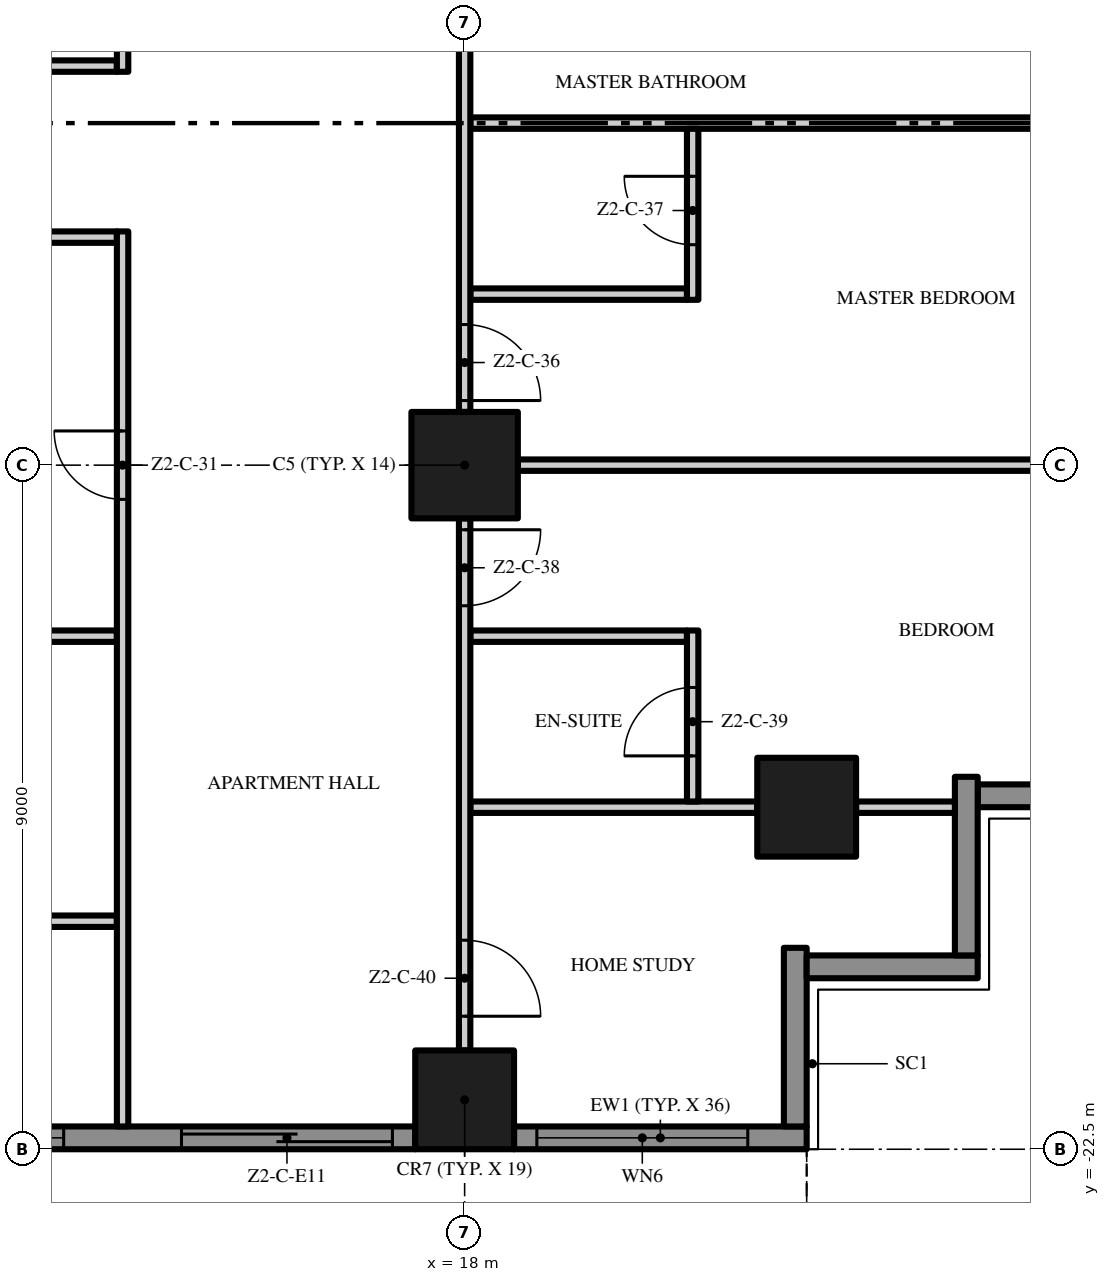
"""IFC4 building model, lengths in metres.
Left out: names, types, materials, properties, quantities, classifications, styles, units other than length and angle.
Written with IfcOpenShell. Run it as: python <this file> out.ifc"""

import sys

from ifc_helpers import new_model, si_unit, direction, frame, frame_2d, origin, origin_2d, place, context, subcontext, project, spatial, polyline, rectangle, outline, extrude, element, fill, save


model = new_model("IFC4")
c1 = context("Model", 3, precision=1e-05, world=origin(), true_north=direction((0.0, 1.0)))
c2 = subcontext(c1, "Body", "Model", "MODEL_VIEW")
j1 = project(units=[si_unit("LENGTHUNIT", "METRE"), si_unit("PLANEANGLEUNIT", "RADIAN")], contexts=[c1])
p1 = place(None, origin())
s1 = spatial("IfcSite", under=j1, at=p1, CompositionType="ELEMENT")
p2 = place(p1, origin())
s2 = spatial("IfcBuilding", under=s1, at=p2, CompositionType="ELEMENT")
p3 = place(p2, frame((0.0, 0.0, 96.0)))
s3 = spatial("IfcBuildingStorey", under=s2, at=p3, CompositionType="ELEMENT", Elevation=96.0)
p4 = place(p3, frame((18.0, -13.5, 0.0), z_axis=(0.0, 0.0, 1.0), x_axis=(1.0, 0.0, 0.0)))
e1 = element("IfcColumn", 1, at=p4, inside=s3, PredefinedType="COLUMN", context=c2, shape_type="SweptSolid", body=[
    extrude(rectangle(XDim=1.4, YDim=1.4, at=origin_2d()), origin(), (0.0, 0.0, 1.0), 3.5),
])
for number, where, z_axis, x_axis in (
    (2, (18.0, -21.85, 0.0), (0.0, 0.0, 1.0), (1.0, 0.0, 0.0)),
    (3, (22.5, -18.0, 0.0), (0.0, 0.0, 1.0), (1.0, 0.0, 0.0)),
):
    element("IfcColumn", number, at=place(p3, frame(where, z_axis=z_axis, x_axis=x_axis)), inside=s3, PredefinedType="COLUMN", context=c2, shape_type="SweptSolid", body=[
        extrude(rectangle(XDim=1.3, YDim=1.3, at=origin_2d()), origin(), (0.0, 0.0, 1.0), 3.5),
    ])
p5 = place(p3, frame((17.35, -22.35, 0.0), z_axis=(0.0, 0.0, 1.0), x_axis=(-1.0, 0.0, 0.0)))
e4 = element("IfcWall", 4, at=p5, inside=s3, PredefinedType="SOLIDWALL", context=c2, shape_type="SweptSolid", body=[
    extrude(rectangle(XDim=7.7, YDim=0.3, at=frame_2d((3.85, 0.0))), origin(), (0.0, 0.0, 1.0), 3.5),
])
p6 = place(p5, frame((4.625, 0.0, 0.45)))
e5 = element("IfcOpeningElement", 5, at=p6, cuts=e4, PredefinedType="OPENING", context=c2, shape_type="SweptSolid", body=[
    extrude(rectangle(XDim=2.775, YDim=2.65, at=frame_2d((1.387, 1.325))), frame((0.0, 0.16, 0.0), z_axis=(0.0, -1.0, 0.0), x_axis=(1.0, 0.0, 0.0)), (0.0, 0.0, 1.0), 0.32),
])
p7 = place(p5, frame((0.3, 0.0, 0.0)))
e6 = element("IfcOpeningElement", 6, at=p7, cuts=e4, PredefinedType="OPENING", context=c2, shape_type="SweptSolid", body=[
    extrude(rectangle(XDim=2.775, YDim=2.4, at=frame_2d((1.387, 1.2))), frame((0.0, 0.16, 0.0), z_axis=(0.0, -1.0, 0.0), x_axis=(1.0, 0.0, 0.0)), (0.0, 0.0, 1.0), 0.32),
])
p8 = place(p3, frame((22.5, -22.35, 0.0), z_axis=(0.0, 0.0, 1.0), x_axis=(-1.0, 0.0, 0.0)))
e7 = element("IfcWall", 7, at=p8, inside=s3, PredefinedType="SOLIDWALL", context=c2, shape_type="SweptSolid", body=[
    extrude(rectangle(XDim=3.85, YDim=0.3, at=frame_2d((1.925, 0.0))), origin(), (0.0, 0.0, 1.0), 3.5),
])
p9 = place(p8, frame((0.775, 0.0, 0.45)))
e8 = element("IfcOpeningElement", 8, at=p9, cuts=e7, PredefinedType="OPENING", context=c2, shape_type="SweptSolid", body=[
    extrude(rectangle(XDim=2.775, YDim=2.65, at=frame_2d((1.387, 1.325))), frame((0.0, 0.16, 0.0), z_axis=(0.0, -1.0, 0.0), x_axis=(1.0, 0.0, 0.0)), (0.0, 0.0, 1.0), 0.32),
])
p10 = place(p3, frame((22.35, -19.85, 0.0), z_axis=(0.0, 0.0, 1.0), x_axis=(0.0, -1.0, 0.0)))
e9 = element("IfcWall", 9, at=p10, inside=s3, PredefinedType="SOLIDWALL", context=c2, shape_type="SweptSolid", body=[
    extrude(rectangle(XDim=2.35, YDim=0.3, at=frame_2d((1.175, 0.0))), origin(), (0.0, 0.0, 1.0), 3.5),
])
p11 = place(p3, frame((24.75, -20.1, 0.0), z_axis=(0.0, 0.0, 1.0), x_axis=(-1.0, 0.0, 0.0)))
e10 = element("IfcWall", 10, at=p11, inside=s3, PredefinedType="SOLIDWALL", context=c2, shape_type="SweptSolid", body=[
    extrude(rectangle(XDim=2.25, YDim=0.3, at=frame_2d((1.125, 0.0))), origin(), (0.0, 0.0, 1.0), 3.5),
])
p12 = place(p3, frame((24.6, -17.6, 0.0), z_axis=(0.0, 0.0, 1.0), x_axis=(0.0, -1.0, 0.0)))
e11 = element("IfcWall", 11, at=p12, inside=s3, PredefinedType="SOLIDWALL", context=c2, shape_type="SweptSolid", body=[
    extrude(rectangle(XDim=2.35, YDim=0.3, at=frame_2d((1.175, 0.0))), origin(), (0.0, 0.0, 1.0), 3.5),
])
p13 = place(p3, frame((27.0, -17.85, 0.0), z_axis=(0.0, 0.0, 1.0), x_axis=(-1.0, 0.0, 0.0)))
e12 = element("IfcWall", 12, at=p13, inside=s3, PredefinedType="SOLIDWALL", context=c2, shape_type="SweptSolid", body=[
    extrude(rectangle(XDim=2.25, YDim=0.3, at=frame_2d((1.125, 0.0))), origin(), (0.0, 0.0, 1.0), 3.5),
])
p14 = place(p3, origin())
e13 = element("IfcWall", 13, at=p14, inside=s3, PredefinedType="USERDEFINED", context=c2, shape_type="SweptSolid", body=[
    extrude(outline(polyline([(-22.5, -23.451), (-21.0, -23.115), (-20.625, -23.1), (-19.5, -23.231), (-18.0, -23.755), (-16.5, -24.488), (-15.0, -25.149), (-13.5, -25.485), (-13.125, -25.5), (-12.0, -25.369), (-10.5, -24.845), (-9.0, -24.112), (-7.5, -23.451), (-6.0, -23.115), (-5.625, -23.1), (-4.5, -23.231), (-3.0, -23.755), (-1.5, -24.488), (0.0, -25.149), (1.5, -25.485), (1.875, -25.5), (3.0, -25.369), (4.5, -24.845), (6.0, -24.112), (7.5, -23.451), (9.0, -23.115), (9.375, -23.1), (10.5, -23.231), (12.0, -23.755), (13.5, -24.488), (15.0, -25.149), (16.5, -25.485), (16.875, -25.5), (18.0, -25.369), (19.5, -24.845), (21.0, -24.112), (22.5, -23.451), (22.399, -23.223), (20.895, -23.885), (19.404, -24.614), (17.944, -25.124), (16.865, -25.249), (16.533, -25.236), (15.079, -24.91), (13.605, -24.261), (12.096, -23.524), (10.556, -22.986), (9.385, -22.849), (8.967, -22.866), (7.421, -23.213), (5.895, -23.885), (4.404, -24.614), (2.944, -25.124), (1.865, -25.249), (1.533, -25.236), (0.079, -24.91), (-1.395, -24.261), (-2.904, -23.524), (-4.444, -22.986), (-5.615, -22.849), (-6.033, -22.866), (-7.579, -23.213), (-9.105, -23.885), (-10.596, -24.614), (-12.056, -25.124), (-13.135, -25.249), (-13.467, -25.236), (-14.921, -24.91), (-16.395, -24.261), (-17.904, -23.524), (-19.444, -22.986), (-20.615, -22.849), (-21.033, -22.866), (-22.555, -23.208), (-22.5, -23.451)])), origin(), (0.0, 0.0, 1.0), 0.9),
])
p15 = place(p3, frame((9.075, -19.5, 0.0), z_axis=(0.0, 0.0, 1.0), x_axis=(1.0, 0.0, 0.0)))
e14 = element("IfcWall", 14, at=p15, inside=s3, PredefinedType="PARTITIONING", context=c2, shape_type="SweptSolid", body=[
    extrude(rectangle(XDim=4.35, YDim=0.15, at=frame_2d((2.175, 0.0))), origin(), (0.0, 0.0, 1.0), 3.5),
])
p16 = place(p3, frame((18.075, -18.0, 0.0), z_axis=(0.0, 0.0, 1.0), x_axis=(1.0, 0.0, 0.0)))
e15 = element("IfcWall", 15, at=p16, inside=s3, PredefinedType="PARTITIONING", context=c2, shape_type="SweptSolid", body=[
    extrude(rectangle(XDim=3.775, YDim=0.15, at=frame_2d((1.887, 0.0))), origin(), (0.0, 0.0, 1.0), 3.5),
])
p17 = place(p3, frame((23.15, -18.0, 0.0), z_axis=(0.0, 0.0, 1.0), x_axis=(1.0, 0.0, 0.0)))
e16 = element("IfcWall", 16, at=p17, inside=s3, PredefinedType="PARTITIONING", context=c2, shape_type="SweptSolid", body=[
    extrude(rectangle(XDim=1.3, YDim=0.15, at=frame_2d((0.65, 0.0))), origin(), (0.0, 0.0, 1.0), 3.5),
])
p18 = place(p3, frame((13.425, -15.75, 0.0), z_axis=(0.0, 0.0, 1.0), x_axis=(-1.0, 0.0, 0.0)))
e17 = element("IfcWall", 17, at=p18, inside=s3, PredefinedType="PARTITIONING", context=c2, shape_type="SweptSolid", body=[
    extrude(rectangle(XDim=4.35, YDim=0.15, at=frame_2d((2.175, 0.0))), origin(), (0.0, 0.0, 1.0), 3.5),
])
p19 = place(p18, frame((1.7, 0.0, 0.0)))
e18 = element("IfcOpeningElement", 18, at=p19, cuts=e17, PredefinedType="OPENING", context=c2, shape_type="SweptSolid", body=[
    extrude(rectangle(XDim=0.9, YDim=2.1, at=frame_2d((0.45, 1.05))), frame((0.0, 0.085, 0.0), z_axis=(0.0, -1.0, 0.0), x_axis=(1.0, 0.0, 0.0)), (0.0, 0.0, 1.0), 0.17),
])
p20 = place(p3, frame((18.075, -15.75, 0.0), z_axis=(0.0, 0.0, 1.0), x_axis=(1.0, 0.0, 0.0)))
e19 = element("IfcWall", 19, at=p20, inside=s3, PredefinedType="PARTITIONING", context=c2, shape_type="SweptSolid", body=[
    extrude(rectangle(XDim=2.85, YDim=0.15, at=frame_2d((1.425, 0.0))), origin(), (0.0, 0.0, 1.0), 3.5),
])
p21 = place(p3, frame((18.7, -13.5, 0.0), z_axis=(0.0, 0.0, 1.0), x_axis=(1.0, 0.0, 0.0)))
e20 = element("IfcWall", 20, at=p21, inside=s3, PredefinedType="PARTITIONING", context=c2, shape_type="SweptSolid", body=[
    extrude(rectangle(XDim=7.0, YDim=0.15, at=frame_2d((3.5, 0.0))), origin(), (0.0, 0.0, 1.0), 3.5),
])
p22 = place(p3, frame((18.075, -11.25, 0.0), z_axis=(0.0, 0.0, 1.0), x_axis=(1.0, 0.0, 0.0)))
e21 = element("IfcWall", 21, at=p22, inside=s3, PredefinedType="PARTITIONING", context=c2, shape_type="SweptSolid", body=[
    extrude(rectangle(XDim=2.85, YDim=0.15, at=frame_2d((1.425, 0.0))), origin(), (0.0, 0.0, 1.0), 3.5),
])
p23 = place(p3, frame((9.075, -10.5, 0.0), z_axis=(0.0, 0.0, 1.0), x_axis=(1.0, 0.0, 0.0)))
e22 = element("IfcWall", 22, at=p23, inside=s3, PredefinedType="PARTITIONING", context=c2, shape_type="SweptSolid", body=[
    extrude(rectangle(XDim=4.35, YDim=0.15, at=frame_2d((2.175, 0.0))), origin(), (0.0, 0.0, 1.0), 3.5),
])
p24 = place(p3, frame((18.075, -9.0, 0.0), z_axis=(0.0, 0.0, 1.0), x_axis=(1.0, 0.0, 0.0)))
e23 = element("IfcWall", 23, at=p24, inside=s3, PredefinedType="PARTITIONING", context=c2, shape_type="SweptSolid", body=[
    extrude(rectangle(XDim=8.625, YDim=0.15, at=frame_2d((4.312, 0.0))), origin(), (0.0, 0.0, 1.0), 3.5),
])
p25 = place(p3, frame((9.075, -8.25, 0.0), z_axis=(0.0, 0.0, 1.0), x_axis=(1.0, 0.0, 0.0)))
e24 = element("IfcWall", 24, at=p25, inside=s3, PredefinedType="PARTITIONING", context=c2, shape_type="SweptSolid", body=[
    extrude(rectangle(XDim=4.35, YDim=0.15, at=frame_2d((2.175, 0.0))), origin(), (0.0, 0.0, 1.0), 3.5),
])
p26 = place(p25, frame((1.75, 0.0, 0.0)))
e25 = element("IfcOpeningElement", 25, at=p26, cuts=e24, PredefinedType="OPENING", context=c2, shape_type="SweptSolid", body=[
    extrude(rectangle(XDim=0.9, YDim=2.1, at=frame_2d((0.45, 1.05))), frame((0.0, 0.085, 0.0), z_axis=(0.0, -1.0, 0.0), x_axis=(1.0, 0.0, 0.0)), (0.0, 0.0, 1.0), 0.17),
])
p27 = place(p3, frame((13.5, -22.2, 0.0), z_axis=(0.0, 0.0, 1.0), x_axis=(0.0, 1.0, 0.0)))
e26 = element("IfcWall", 26, at=p27, inside=s3, PredefinedType="PARTITIONING", context=c2, shape_type="SweptSolid", body=[
    extrude(rectangle(XDim=11.775, YDim=0.15, at=frame_2d((5.888, 0.0))), origin(), (0.0, 0.0, 1.0), 3.5),
])
p28 = place(p27, frame((8.25, 0.0, 0.0)))
e27 = element("IfcOpeningElement", 27, at=p28, cuts=e26, PredefinedType="OPENING", context=c2, shape_type="SweptSolid", body=[
    extrude(rectangle(XDim=0.9, YDim=2.1, at=frame_2d((0.45, 1.05))), frame((0.0, 0.085, 0.0), z_axis=(0.0, -1.0, 0.0), x_axis=(1.0, 0.0, 0.0)), (0.0, 0.0, 1.0), 0.17),
])
p29 = place(p3, frame((13.5, -8.325, 0.0), z_axis=(0.0, 0.0, 1.0), x_axis=(0.0, 1.0, 0.0)))
e28 = element("IfcWall", 28, at=p29, inside=s3, PredefinedType="PARTITIONING", context=c2, shape_type="SweptSolid", body=[
    extrude(rectangle(XDim=8.225, YDim=0.15, at=frame_2d((4.112, 0.0))), origin(), (0.0, 0.0, 1.0), 3.5),
])
p30 = place(p3, frame((18.0, -14.2, 0.0), z_axis=(0.0, 0.0, 1.0), x_axis=(0.0, -1.0, 0.0)))
e29 = element("IfcWall", 29, at=p30, inside=s3, PredefinedType="PARTITIONING", context=c2, shape_type="SweptSolid", body=[
    extrude(rectangle(XDim=7.0, YDim=0.15, at=frame_2d((3.5, 0.0))), origin(), (0.0, 0.0, 1.0), 3.5),
])
p31 = place(p30, frame((0.15, 0.0, 0.0)))
e30 = element("IfcOpeningElement", 30, at=p31, cuts=e29, PredefinedType="OPENING", context=c2, shape_type="SweptSolid", body=[
    extrude(rectangle(XDim=1.0, YDim=2.4, at=frame_2d((0.5, 1.2))), frame((0.0, 0.085, 0.0), z_axis=(0.0, -1.0, 0.0), x_axis=(1.0, 0.0, 0.0)), (0.0, 0.0, 1.0), 0.17),
])
p32 = place(p30, frame((5.55, 0.0, 0.0)))
e31 = element("IfcOpeningElement", 31, at=p32, cuts=e29, PredefinedType="OPENING", context=c2, shape_type="SweptSolid", body=[
    extrude(rectangle(XDim=1.0, YDim=2.4, at=frame_2d((0.5, 1.2))), frame((0.0, 0.085, 0.0), z_axis=(0.0, -1.0, 0.0), x_axis=(1.0, 0.0, 0.0)), (0.0, 0.0, 1.0), 0.17),
])
p33 = place(p3, frame((18.0, -5.2, 0.0), z_axis=(0.0, 0.0, 1.0), x_axis=(0.0, -1.0, 0.0)))
e32 = element("IfcWall", 32, at=p33, inside=s3, PredefinedType="PARTITIONING", context=c2, shape_type="SweptSolid", body=[
    extrude(rectangle(XDim=7.6, YDim=0.15, at=frame_2d((3.8, 0.0))), origin(), (0.0, 0.0, 1.0), 3.5),
])
p34 = place(p33, frame((0.15, 0.0, 0.0)))
e33 = element("IfcOpeningElement", 33, at=p34, cuts=e32, PredefinedType="OPENING", context=c2, shape_type="SweptSolid", body=[
    extrude(rectangle(XDim=1.8, YDim=2.4, at=frame_2d((0.9, 1.2))), frame((0.0, 0.085, 0.0), z_axis=(0.0, -1.0, 0.0), x_axis=(1.0, 0.0, 0.0)), (0.0, 0.0, 1.0), 0.17),
])
p35 = place(p33, frame((6.45, 0.0, 0.0)))
e34 = element("IfcOpeningElement", 34, at=p35, cuts=e32, PredefinedType="OPENING", context=c2, shape_type="SweptSolid", body=[
    extrude(rectangle(XDim=1.0, YDim=2.4, at=frame_2d((0.5, 1.2))), frame((0.0, 0.085, 0.0), z_axis=(0.0, -1.0, 0.0), x_axis=(1.0, 0.0, 0.0)), (0.0, 0.0, 1.0), 0.17),
])
p36 = place(p3, frame((21.0, -17.925, 0.0), z_axis=(0.0, 0.0, 1.0), x_axis=(0.0, 1.0, 0.0)))
e35 = element("IfcWall", 35, at=p36, inside=s3, PredefinedType="PARTITIONING", context=c2, shape_type="SweptSolid", body=[
    extrude(rectangle(XDim=2.25, YDim=0.15, at=frame_2d((1.125, 0.0))), origin(), (0.0, 0.0, 1.0), 3.5),
])
p37 = place(p36, frame((0.6, 0.0, 0.0)))
e36 = element("IfcOpeningElement", 36, at=p37, cuts=e35, PredefinedType="OPENING", context=c2, shape_type="SweptSolid", body=[
    extrude(rectangle(XDim=0.9, YDim=2.1, at=frame_2d((0.45, 1.05))), frame((0.0, 0.085, 0.0), z_axis=(0.0, -1.0, 0.0), x_axis=(1.0, 0.0, 0.0)), (0.0, 0.0, 1.0), 0.17),
])
p38 = place(p3, frame((21.0, -11.325, 0.0), z_axis=(0.0, 0.0, 1.0), x_axis=(0.0, 1.0, 0.0)))
e37 = element("IfcWall", 37, at=p38, inside=s3, PredefinedType="PARTITIONING", context=c2, shape_type="SweptSolid", body=[
    extrude(rectangle(XDim=2.25, YDim=0.15, at=frame_2d((1.125, 0.0))), origin(), (0.0, 0.0, 1.0), 3.5),
])
p39 = place(p38, frame((0.725, 0.0, 0.0)))
e38 = element("IfcOpeningElement", 38, at=p39, cuts=e37, PredefinedType="OPENING", context=c2, shape_type="SweptSolid", body=[
    extrude(rectangle(XDim=0.9, YDim=2.1, at=frame_2d((0.45, 1.05))), frame((0.0, 0.085, 0.0), z_axis=(0.0, -1.0, 0.0), x_axis=(1.0, 0.0, 0.0)), (0.0, 0.0, 1.0), 0.17),
])
p40 = place(p6, origin())
e39 = element("IfcWindow", 39, at=p40, inside=s3, PartitioningType="SINGLE_PANEL", PredefinedType="WINDOW", context=c2, shape_type="SweptSolid", body=[
    extrude(rectangle(XDim=2.775, YDim=2.65, at=frame_2d((1.387, 1.325))), frame((0.0, 0.03, 0.0), z_axis=(0.0, -1.0, 0.0), x_axis=(1.0, 0.0, 0.0)), (0.0, 0.0, 1.0), 0.06),
])
fill(e5, e39)
p41 = place(p7, origin())
e40 = element("IfcDoor", 40, at=p41, inside=s3, OperationType="SINGLE_SWING_LEFT", PredefinedType="DOOR", context=c2, shape_type="SweptSolid", body=[
    extrude(rectangle(XDim=2.775, YDim=2.4, at=frame_2d((1.387, 1.2))), frame((0.0, 0.025, 0.0), z_axis=(0.0, -1.0, 0.0), x_axis=(1.0, 0.0, 0.0)), (0.0, 0.0, 1.0), 0.05),
])
fill(e6, e40)
p42 = place(p9, origin())
e41 = element("IfcWindow", 41, at=p42, inside=s3, PartitioningType="SINGLE_PANEL", PredefinedType="WINDOW", context=c2, shape_type="SweptSolid", body=[
    extrude(rectangle(XDim=2.775, YDim=2.65, at=frame_2d((1.387, 1.325))), frame((0.0, 0.03, 0.0), z_axis=(0.0, -1.0, 0.0), x_axis=(1.0, 0.0, 0.0)), (0.0, 0.0, 1.0), 0.06),
])
fill(e8, e41)
p43 = place(p28, origin())
e42 = element("IfcDoor", 42, at=p43, inside=s3, OperationType="SINGLE_SWING_RIGHT", PredefinedType="DOOR", context=c2, shape_type="SweptSolid", body=[
    extrude(rectangle(XDim=0.9, YDim=2.1, at=frame_2d((0.45, 1.05))), frame((0.0, 0.025, 0.0), z_axis=(0.0, -1.0, 0.0), x_axis=(1.0, 0.0, 0.0)), (0.0, 0.0, 1.0), 0.05),
])
fill(e27, e42)
p44 = place(p35, origin())
e43 = element("IfcDoor", 43, at=p44, inside=s3, OperationType="SINGLE_SWING_RIGHT", PredefinedType="DOOR", context=c2, shape_type="SweptSolid", body=[
    extrude(rectangle(XDim=1.0, YDim=2.4, at=frame_2d((0.5, 1.2))), frame((0.0, 0.025, 0.0), z_axis=(0.0, -1.0, 0.0), x_axis=(1.0, 0.0, 0.0)), (0.0, 0.0, 1.0), 0.05),
])
fill(e34, e43)
p45 = place(p39, origin())
e44 = element("IfcDoor", 44, at=p45, inside=s3, OperationType="SINGLE_SWING_RIGHT", PredefinedType="DOOR", context=c2, shape_type="SweptSolid", body=[
    extrude(rectangle(XDim=0.9, YDim=2.1, at=frame_2d((0.45, 1.05))), frame((0.0, 0.025, 0.0), z_axis=(0.0, -1.0, 0.0), x_axis=(1.0, 0.0, 0.0)), (0.0, 0.0, 1.0), 0.05),
])
fill(e38, e44)
p46 = place(p31, origin())
e45 = element("IfcDoor", 45, at=p46, inside=s3, OperationType="SINGLE_SWING_LEFT", PredefinedType="DOOR", context=c2, shape_type="SweptSolid", body=[
    extrude(rectangle(XDim=1.0, YDim=2.4, at=frame_2d((0.5, 1.2))), frame((0.0, 0.025, 0.0), z_axis=(0.0, -1.0, 0.0), x_axis=(1.0, 0.0, 0.0)), (0.0, 0.0, 1.0), 0.05),
])
fill(e30, e45)
p47 = place(p37, origin())
e46 = element("IfcDoor", 46, at=p47, inside=s3, OperationType="SINGLE_SWING_LEFT", PredefinedType="DOOR", context=c2, shape_type="SweptSolid", body=[
    extrude(rectangle(XDim=0.9, YDim=2.1, at=frame_2d((0.45, 1.05))), frame((0.0, 0.025, 0.0), z_axis=(0.0, -1.0, 0.0), x_axis=(1.0, 0.0, 0.0)), (0.0, 0.0, 1.0), 0.05),
])
fill(e36, e46)
p48 = place(p32, origin())
e47 = element("IfcDoor", 47, at=p48, inside=s3, OperationType="SINGLE_SWING_RIGHT", PredefinedType="DOOR", context=c2, shape_type="SweptSolid", body=[
    extrude(rectangle(XDim=1.0, YDim=2.4, at=frame_2d((0.5, 1.2))), frame((0.0, 0.025, 0.0), z_axis=(0.0, -1.0, 0.0), x_axis=(1.0, 0.0, 0.0)), (0.0, 0.0, 1.0), 0.05),
])
fill(e31, e47)
save(model, sys.argv[1])
